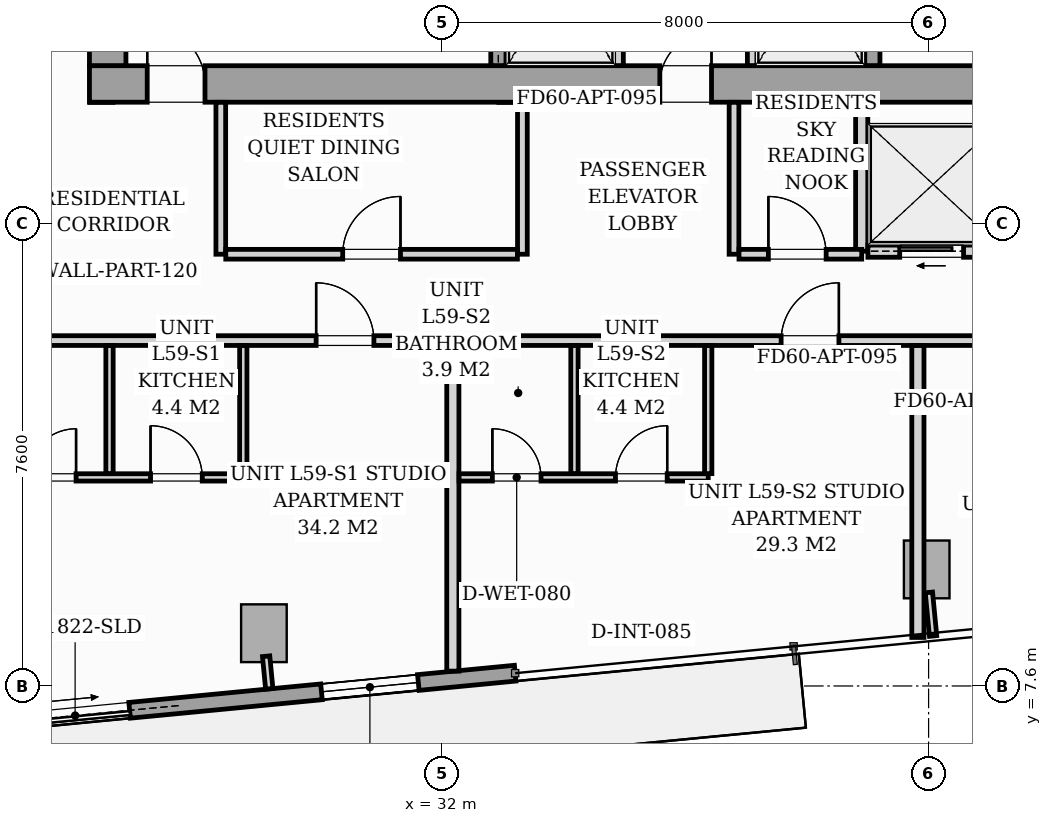
"""IFC4 building model, lengths in metres.
Left out: names, types, materials, properties, quantities, classifications, styles, units other than length and angle.
Written with IfcOpenShell. Run it as: python <this file> out.ifc"""

import sys

from ifc_helpers import new_model, si_unit, direction, frame, frame_2d, origin, origin_2d, place, context, subcontext, project, spatial, rectangle, i_section, extrude, source, transform, mapped, element, fill, save


model = new_model("IFC4")
c1 = context("Model", 3, precision=1e-05, world=origin(), true_north=direction((0.0, 1.0)))
c2 = subcontext(c1, "Body", "Model", "MODEL_VIEW")
j1 = project(units=[si_unit("LENGTHUNIT", "METRE"), si_unit("PLANEANGLEUNIT", "RADIAN")], contexts=[c1])
p1 = place(None, origin())
s1 = spatial("IfcSite", under=j1, at=p1, CompositionType="ELEMENT")
p2 = place(p1, origin())
s2 = spatial("IfcBuilding", under=s1, at=p2, CompositionType="ELEMENT")
p3 = place(p2, frame((0.0, 0.0, 205.0)))
s3 = spatial("IfcBuildingStorey", under=s2, at=p3, CompositionType="ELEMENT", Elevation=205.0)
m1 = source(origin(), c2, "Body", "SweptSolid", [
    extrude(i_section(OverallWidth=0.416, OverallDepth=0.446, WebThickness=0.039, FlangeThickness=0.063, FilletRadius=0.018, at=origin_2d()), origin(), (0.0, 0.0, 1.0), 3.196),
])
for number, where, z_axis, x_axis in (
    (1, (26.4, 17.4, 0.002), (0.0, 0.0, 1.0), (1.0, 0.0, 0.0)),
    (2, (33.12, 17.4, 0.002), (0.0, 0.0, 1.0), (1.0, 0.0, 0.0)),
    (3, (38.88, 17.4, 0.002), (0.0, 0.0, 1.0), (1.0, 0.0, 0.0)),
):
    element("IfcColumn", number, at=place(p3, frame(where, z_axis=z_axis, x_axis=x_axis)), inside=s3, PredefinedType="PILASTER", context=c2, shape_type="MappedRepresentation", body=[
        mapped(m1, transform((0.0, 0.0, 0.0), scale=1.0)),
    ])
m2 = source(origin(), c2, "Body", "SweptSolid", [
    extrude(rectangle(XDim=0.75, YDim=0.95, at=origin_2d()), origin(), (0.0, 0.0, 1.0), 3.196),
])
for number, where, z_axis, x_axis in (
    (4, (29.069, 8.467, 0.002), (0.0, 0.0, 1.0), (0.995, 0.096, 0.0)),
    (5, (39.969, 9.517, 0.002), (0.0, 0.0, 1.0), (0.995, 0.096, 0.0)),
):
    element("IfcColumn", number, at=place(p3, frame(where, z_axis=z_axis, x_axis=x_axis)), inside=s3, PredefinedType="COLUMN", context=c2, shape_type="MappedRepresentation", body=[
        mapped(m2, transform((0.0, 0.0, 0.0), scale=1.0)),
    ])
p4 = place(p3, frame((33.201, 7.81, 0.0), z_axis=(0.0, 0.0, 1.0), x_axis=(-0.995397074604, -0.095836652014, 0.0)))
e6 = element("IfcWall", 6, at=p4, inside=s3, PredefinedType="STANDARD", context=c2, shape_type="SweptSolid", body=[
    extrude(rectangle(XDim=16.1, YDim=0.26, at=frame_2d((8.05, 0.0))), origin(), (0.0, 0.0, 1.0), 2.94),
])
p5 = place(p4, frame((6.37, 0.0, 0.0)))
e7 = element("IfcOpeningElement", 7, at=p5, cuts=e6, PredefinedType="OPENING", context=c2, shape_type="SweptSolid", body=[
    extrude(rectangle(XDim=1.8, YDim=2.06, at=frame_2d((0.9, 1.03))), frame((0.0, 0.14, 0.0), z_axis=(0.0, -1.0, 0.0), x_axis=(1.0, 0.0, 0.0)), (0.0, 0.0, 1.0), 0.28),
])
p6 = place(p4, frame((1.6, 0.0, 0.65)))
e8 = element("IfcOpeningElement", 8, at=p6, cuts=e6, PredefinedType="OPENING", context=c2, shape_type="SweptSolid", body=[
    extrude(rectangle(XDim=1.6, YDim=1.5, at=frame_2d((0.8, 0.75))), frame((0.0, 0.14, 0.0), z_axis=(0.0, -1.0, 0.0), x_axis=(1.0, 0.0, 0.0)), (0.0, 0.0, 1.0), 0.28),
])
p7 = place(p3, frame((26.2, 17.5, 0.0), z_axis=(0.0, 0.0, 1.0), x_axis=(1.0, 0.0, 0.0)))
e9 = element("IfcWall", 9, at=p7, inside=s3, PredefinedType="SHEAR", context=c2, shape_type="SweptSolid", body=[
    extrude(rectangle(XDim=19.6, YDim=0.6, at=frame_2d((9.8, 0.0))), origin(), (0.0, 0.0, 1.0), 3.2),
])
p8 = place(p7, frame((0.95, 0.0, 0.0)))
e10 = element("IfcOpeningElement", 10, at=p8, cuts=e9, PredefinedType="OPENING", context=c2, shape_type="SweptSolid", body=[
    extrude(rectangle(XDim=0.95, YDim=2.06, at=frame_2d((0.475, 1.03))), frame((0.0, 0.31, 0.0), z_axis=(0.0, -1.0, 0.0), x_axis=(1.0, 0.0, 0.0)), (0.0, 0.0, 1.0), 0.62),
])
p9 = place(p7, frame((9.38, 0.0, 0.0)))
e11 = element("IfcOpeningElement", 11, at=p9, cuts=e9, PredefinedType="OPENING", context=c2, shape_type="SweptSolid", body=[
    extrude(rectangle(XDim=0.85, YDim=2.0, at=frame_2d((0.425, 1.0))), frame((0.0, 0.31, 0.0), z_axis=(0.0, -1.0, 0.0), x_axis=(1.0, 0.0, 0.0)), (0.0, 0.0, 1.0), 0.62),
])
p10 = place(p7, frame((17.55, 0.0, 0.0)))
e12 = element("IfcOpeningElement", 12, at=p10, cuts=e9, PredefinedType="OPENING", context=c2, shape_type="SweptSolid", body=[
    extrude(rectangle(XDim=0.95, YDim=2.06, at=frame_2d((0.475, 1.03))), frame((0.0, 0.31, 0.0), z_axis=(0.0, -1.0, 0.0), x_axis=(1.0, 0.0, 0.0)), (0.0, 0.0, 1.0), 0.62),
])
p11 = place(p3, frame((26.5, 17.802, 0.0), z_axis=(0.0, 0.0, 1.0), x_axis=(0.0, 1.0, 0.0)))
e13 = element("IfcWall", 13, at=p11, inside=s3, PredefinedType="SHEAR", context=c2, shape_type="SweptSolid", body=[
    extrude(rectangle(XDim=5.796, YDim=0.6, at=frame_2d((2.898, 0.0))), origin(), (0.0, 0.0, 1.0), 3.2),
])
p12 = place(p3, frame((32.925, 17.802, 0.0), z_axis=(0.0, 0.0, 1.0), x_axis=(0.0, 1.0, 0.0)))
e14 = element("IfcWall", 14, at=p12, inside=s3, PredefinedType="SOLIDWALL", context=c2, shape_type="SweptSolid", body=[
    extrude(rectangle(XDim=2.646, YDim=0.25, at=frame_2d((1.323, 0.0))), origin(), (0.0, 0.0, 1.0), 3.2),
])
p13 = place(p12, frame((0.548, 0.0, 0.0)))
e15 = element("IfcOpeningElement", 15, at=p13, cuts=e14, PredefinedType="OPENING", context=c2, shape_type="SweptSolid", body=[
    extrude(rectangle(XDim=1.1, YDim=2.08, at=frame_2d((0.55, 1.04))), frame((0.0, 0.135, 0.0), z_axis=(0.0, -1.0, 0.0), x_axis=(1.0, 0.0, 0.0)), (0.0, 0.0, 1.0), 0.27),
])
for number, where, z_axis, x_axis in (
    (16, (34.9, 17.802, 0.0), (0.0, 0.0, 1.0), (0.0, 1.0, 0.0)),
    (17, (37.1, 17.802, 0.0), (0.0, 0.0, 1.0), (0.0, 1.0, 0.0)),
):
    element("IfcWall", number, at=place(p3, frame(where, z_axis=z_axis, x_axis=x_axis)), inside=s3, PredefinedType="PARTITIONING", context=c2, shape_type="SweptSolid", body=[
        extrude(rectangle(XDim=2.646, YDim=0.16, at=frame_2d((1.323, 0.0))), origin(), (0.0, 0.0, 1.0), 2.94),
    ])
p14 = place(p3, frame((39.075, 17.802, 0.0), z_axis=(0.0, 0.0, 1.0), x_axis=(0.0, 1.0, 0.0)))
e18 = element("IfcWall", 18, at=p14, inside=s3, PredefinedType="SOLIDWALL", context=c2, shape_type="SweptSolid", body=[
    extrude(rectangle(XDim=2.646, YDim=0.25, at=frame_2d((1.323, 0.0))), origin(), (0.0, 0.0, 1.0), 3.2),
])
p15 = place(p14, frame((0.548, 0.0, 0.0)))
e19 = element("IfcOpeningElement", 19, at=p15, cuts=e18, PredefinedType="OPENING", context=c2, shape_type="SweptSolid", body=[
    extrude(rectangle(XDim=1.1, YDim=2.08, at=frame_2d((0.55, 1.04))), frame((0.0, 0.135, 0.0), z_axis=(0.0, -1.0, 0.0), x_axis=(1.0, 0.0, 0.0)), (0.0, 0.0, 1.0), 0.27),
])
p16 = place(p3, frame((38.9, 14.75, 0.0), z_axis=(0.0, 0.0, 1.0), x_axis=(0.0, 1.0, 0.0)))
e20 = element("IfcWall", 20, at=p16, inside=s3, PredefinedType="PARTITIONING", context=c2, shape_type="SweptSolid", body=[
    extrude(rectangle(XDim=2.35, YDim=0.2, at=frame_2d((1.175, 0.0))), origin(), (0.0, 0.0, 1.0), 2.94),
])
p17 = place(p3, frame((39.002, 14.75, 0.0), z_axis=(0.0, 0.0, 1.0), x_axis=(1.0, 0.0, 0.0)))
e21 = element("IfcWall", 21, at=p17, inside=s3, PredefinedType="PARTITIONING", context=c2, shape_type="SweptSolid", body=[
    extrude(rectangle(XDim=2.146, YDim=0.2, at=frame_2d((1.073, 0.0))), origin(), (0.0, 0.0, 1.0), 2.94),
])
p18 = place(p17, frame((0.523, 0.0, 0.0)))
e22 = element("IfcOpeningElement", 22, at=p18, cuts=e21, PredefinedType="OPENING", context=c2, shape_type="SweptSolid", body=[
    extrude(rectangle(XDim=1.05, YDim=2.08, at=frame_2d((0.525, 1.04))), frame((0.0, 0.11, 0.0), z_axis=(0.0, -1.0, 0.0), x_axis=(1.0, 0.0, 0.0)), (0.0, 0.0, 1.0), 0.22),
])
p19 = place(p3, frame((24.55, 13.28, 0.0), z_axis=(0.0, 0.0, 1.0), x_axis=(1.0, 0.0, 0.0)))
e23 = element("IfcWall", 23, at=p19, inside=s3, PredefinedType="PARTITIONING", context=c2, shape_type="SweptSolid", body=[
    extrude(rectangle(XDim=22.9, YDim=0.16, at=frame_2d((11.45, 0.0))), origin(), (0.0, 0.0, 1.0), 2.94),
])
p20 = place(p19, frame((5.378, 0.0, 0.0)))
e24 = element("IfcOpeningElement", 24, at=p20, cuts=e23, PredefinedType="OPENING", context=c2, shape_type="SweptSolid", body=[
    extrude(rectangle(XDim=0.95, YDim=2.06, at=frame_2d((0.475, 1.03))), frame((0.0, 0.09, 0.0), z_axis=(0.0, -1.0, 0.0), x_axis=(1.0, 0.0, 0.0)), (0.0, 0.0, 1.0), 0.18),
])
p21 = place(p19, frame((13.025, 0.0, 0.0)))
e25 = element("IfcOpeningElement", 25, at=p21, cuts=e23, PredefinedType="OPENING", context=c2, shape_type="SweptSolid", body=[
    extrude(rectangle(XDim=0.95, YDim=2.06, at=frame_2d((0.475, 1.03))), frame((0.0, 0.09, 0.0), z_axis=(0.0, -1.0, 0.0), x_axis=(1.0, 0.0, 0.0)), (0.0, 0.0, 1.0), 0.18),
])
p22 = place(p19, frame((16.572, 0.0, 0.0)))
e26 = element("IfcOpeningElement", 26, at=p22, cuts=e23, PredefinedType="OPENING", context=c2, shape_type="SweptSolid", body=[
    extrude(rectangle(XDim=0.95, YDim=2.06, at=frame_2d((0.475, 1.03))), frame((0.0, 0.09, 0.0), z_axis=(0.0, -1.0, 0.0), x_axis=(1.0, 0.0, 0.0)), (0.0, 0.0, 1.0), 0.18),
])
p23 = place(p3, frame((24.632, 11.03, 0.0), z_axis=(0.0, 0.0, 1.0), x_axis=(1.0, 0.0, 0.0)))
e27 = element("IfcWall", 27, at=p23, inside=s3, PredefinedType="PARTITIONING", context=c2, shape_type="SweptSolid", body=[
    extrude(rectangle(XDim=4.098, YDim=0.12, at=frame_2d((2.049, 0.0))), origin(), (0.0, 0.0, 1.0), 2.94),
])
p24 = place(p23, frame((0.548, 0.0, 0.0)))
e28 = element("IfcOpeningElement", 28, at=p24, cuts=e27, PredefinedType="OPENING", context=c2, shape_type="SweptSolid", body=[
    extrude(rectangle(XDim=0.8, YDim=2.02, at=frame_2d((0.4, 1.01))), frame((0.0, 0.07, 0.0), z_axis=(0.0, -1.0, 0.0), x_axis=(1.0, 0.0, 0.0)), (0.0, 0.0, 1.0), 0.14),
])
p25 = place(p23, frame((2.573, 0.0, 0.0)))
e29 = element("IfcOpeningElement", 29, at=p25, cuts=e27, PredefinedType="OPENING", context=c2, shape_type="SweptSolid", body=[
    extrude(rectangle(XDim=0.85, YDim=2.05, at=frame_2d((0.425, 1.025))), frame((0.0, 0.07, 0.0), z_axis=(0.0, -1.0, 0.0), x_axis=(1.0, 0.0, 0.0)), (0.0, 0.0, 1.0), 0.14),
])
for number, where, z_axis, x_axis in (
    (30, (28.73, 11.092, 0.0), (0.0, 0.0, 1.0), (0.0, 1.0, 0.0)),
    (31, (26.53, 11.092, 0.0), (0.0, 0.0, 1.0), (0.0, 1.0, 0.0)),
):
    element("IfcWall", number, at=place(p3, frame(where, z_axis=z_axis, x_axis=x_axis)), inside=s3, PredefinedType="PARTITIONING", context=c2, shape_type="SweptSolid", body=[
        extrude(rectangle(XDim=2.106, YDim=0.12, at=frame_2d((1.053, 0.0))), origin(), (0.0, 0.0, 1.0), 2.94),
    ])
p26 = place(p3, frame((32.176, 7.844, 0.0), z_axis=(0.0, 0.0, 1.0), x_axis=(0.0, 1.0, 0.0)))
e32 = element("IfcWall", 32, at=p26, inside=s3, PredefinedType="PARTITIONING", context=c2, shape_type="SweptSolid", body=[
    extrude(rectangle(XDim=5.354, YDim=0.2, at=frame_2d((2.677, 0.0))), origin(), (0.0, 0.0, 1.0), 2.94),
])
p27 = place(p3, frame((32.278, 11.03, 0.0), z_axis=(0.0, 0.0, 1.0), x_axis=(1.0, 0.0, 0.0)))
e33 = element("IfcWall", 33, at=p27, inside=s3, PredefinedType="PARTITIONING", context=c2, shape_type="SweptSolid", body=[
    extrude(rectangle(XDim=4.098, YDim=0.12, at=frame_2d((2.049, 0.0))), origin(), (0.0, 0.0, 1.0), 2.94),
])
p28 = place(p27, frame((0.548, 0.0, 0.0)))
e34 = element("IfcOpeningElement", 34, at=p28, cuts=e33, PredefinedType="OPENING", context=c2, shape_type="SweptSolid", body=[
    extrude(rectangle(XDim=0.8, YDim=2.02, at=frame_2d((0.4, 1.01))), frame((0.0, 0.07, 0.0), z_axis=(0.0, -1.0, 0.0), x_axis=(1.0, 0.0, 0.0)), (0.0, 0.0, 1.0), 0.14),
])
p29 = place(p27, frame((2.573, 0.0, 0.0)))
e35 = element("IfcOpeningElement", 35, at=p29, cuts=e33, PredefinedType="OPENING", context=c2, shape_type="SweptSolid", body=[
    extrude(rectangle(XDim=0.85, YDim=2.05, at=frame_2d((0.425, 1.025))), frame((0.0, 0.07, 0.0), z_axis=(0.0, -1.0, 0.0), x_axis=(1.0, 0.0, 0.0)), (0.0, 0.0, 1.0), 0.14),
])
for number, where, z_axis, x_axis in (
    (36, (36.376, 11.092, 0.0), (0.0, 0.0, 1.0), (0.0, 1.0, 0.0)),
    (37, (34.176, 11.092, 0.0), (0.0, 0.0, 1.0), (0.0, 1.0, 0.0)),
):
    element("IfcWall", number, at=place(p3, frame(where, z_axis=z_axis, x_axis=x_axis)), inside=s3, PredefinedType="PARTITIONING", context=c2, shape_type="SweptSolid", body=[
        extrude(rectangle(XDim=2.106, YDim=0.12, at=frame_2d((1.053, 0.0))), origin(), (0.0, 0.0, 1.0), 2.94),
    ])
p30 = place(p3, frame((39.824, 8.398, 0.0), z_axis=(0.0, 0.0, 1.0), x_axis=(0.0, 1.0, 0.0)))
e38 = element("IfcWall", 38, at=p30, inside=s3, PredefinedType="PARTITIONING", context=c2, shape_type="SweptSolid", body=[
    extrude(rectangle(XDim=4.8, YDim=0.2, at=frame_2d((2.4, 0.0))), origin(), (0.0, 0.0, 1.0), 2.94),
])
for number, where, z_axis, x_axis in (
    (39, (28.36, 14.7, 0.0), (0.0, 0.0, 1.0), (0.0, 1.0, 0.0)),
    (40, (33.32, 14.7, 0.0), (0.0, 0.0, 1.0), (0.0, 1.0, 0.0)),
):
    element("IfcWall", number, at=place(p3, frame(where, z_axis=z_axis, x_axis=x_axis)), inside=s3, PredefinedType="PARTITIONING", context=c2, shape_type="SweptSolid", body=[
        extrude(rectangle(XDim=2.498, YDim=0.16, at=frame_2d((1.249, 0.0))), origin(), (0.0, 0.0, 1.0), 2.94),
    ])
p31 = place(p3, frame((28.442, 14.7, 0.0), z_axis=(0.0, 0.0, 1.0), x_axis=(1.0, 0.0, 0.0)))
e41 = element("IfcWall", 41, at=p31, inside=s3, PredefinedType="PARTITIONING", context=c2, shape_type="SweptSolid", body=[
    extrude(rectangle(XDim=4.796, YDim=0.16, at=frame_2d((2.398, 0.0))), origin(), (0.0, 0.0, 1.0), 2.94),
])
p32 = place(p31, frame((1.923, 0.0, 0.0)))
e42 = element("IfcOpeningElement", 42, at=p32, cuts=e41, PredefinedType="OPENING", context=c2, shape_type="SweptSolid", body=[
    extrude(rectangle(XDim=0.95, YDim=2.06, at=frame_2d((0.475, 1.03))), frame((0.0, 0.09, 0.0), z_axis=(0.0, -1.0, 0.0), x_axis=(1.0, 0.0, 0.0)), (0.0, 0.0, 1.0), 0.18),
])
p33 = place(p3, frame((36.8, 14.7, 0.0), z_axis=(0.0, 0.0, 1.0), x_axis=(0.0, 1.0, 0.0)))
e43 = element("IfcWall", 43, at=p33, inside=s3, PredefinedType="PARTITIONING", context=c2, shape_type="SweptSolid", body=[
    extrude(rectangle(XDim=2.498, YDim=0.16, at=frame_2d((1.249, 0.0))), origin(), (0.0, 0.0, 1.0), 2.94),
])
p34 = place(p3, frame((36.882, 14.7, 0.0), z_axis=(0.0, 0.0, 1.0), x_axis=(1.0, 0.0, 0.0)))
e44 = element("IfcWall", 44, at=p34, inside=s3, PredefinedType="PARTITIONING", context=c2, shape_type="SweptSolid", body=[
    extrude(rectangle(XDim=2.018, YDim=0.16, at=frame_2d((1.009, 0.0))), origin(), (0.0, 0.0, 1.0), 2.94),
])
p35 = place(p34, frame((0.483, 0.0, 0.0)))
e45 = element("IfcOpeningElement", 45, at=p35, cuts=e44, PredefinedType="OPENING", context=c2, shape_type="SweptSolid", body=[
    extrude(rectangle(XDim=0.95, YDim=2.06, at=frame_2d((0.475, 1.03))), frame((0.0, 0.09, 0.0), z_axis=(0.0, -1.0, 0.0), x_axis=(1.0, 0.0, 0.0)), (0.0, 0.0, 1.0), 0.18),
])
p36 = place(p3, frame((29.105, 8.089, 0.0), z_axis=(0.0, 0.0, 1.0), x_axis=(0.095772948675, -0.995403205893, 0.0)))
e46 = element("IfcWall", 46, at=p36, inside=s3, PredefinedType="PARTITIONING", context=c2, shape_type="SweptSolid", body=[
    extrude(rectangle(XDim=0.538, YDim=0.12, at=frame_2d((0.269, 0.0))), origin(), (0.0, 0.0, 1.0), 2.94),
])
p37 = place(p3, frame((40.005, 9.139, 0.0), z_axis=(0.0, 0.0, 1.0), x_axis=(0.095977354523, -0.995383517755, 0.0)))
e47 = element("IfcWall", 47, at=p37, inside=s3, PredefinedType="PARTITIONING", context=c2, shape_type="SweptSolid", body=[
    extrude(rectangle(XDim=0.72, YDim=0.12, at=frame_2d((0.36, 0.0))), origin(), (0.0, 0.0, 1.0), 2.94),
])
m3 = source(origin(), c2, "Body", "SweptSolid", [
    extrude(rectangle(XDim=1.8, YDim=2.06, at=frame_2d((0.9, 1.03))), frame((0.0, 0.025, 0.0), z_axis=(0.0, -1.0, 0.0), x_axis=(1.0, 0.0, 0.0)), (0.0, 0.0, 1.0), 0.05),
])
p38 = place(p5, origin())
e48 = element("IfcDoor", 48, at=p38, inside=s3, OperationType="SLIDING_TO_LEFT", PredefinedType="DOOR", context=c2, shape_type="MappedRepresentation", body=[
    mapped(m3, transform((0.0, 0.0, 0.0), scale=1.0)),
])
fill(e7, e48)
m4 = source(origin(), c2, "Body", "SweptSolid", [
    extrude(rectangle(XDim=1.6, YDim=1.5, at=frame_2d((0.8, 0.75))), frame((0.0, 0.03, 0.0), z_axis=(0.0, -1.0, 0.0), x_axis=(1.0, 0.0, 0.0)), (0.0, 0.0, 1.0), 0.06),
])
p39 = place(p6, origin())
e49 = element("IfcWindow", 49, at=p39, inside=s3, PartitioningType="SINGLE_PANEL", PredefinedType="WINDOW", context=c2, shape_type="MappedRepresentation", body=[
    mapped(m4, transform((0.0, 0.0, 0.0), scale=1.0)),
])
fill(e8, e49)
m5 = source(origin(), c2, "Body", "SweptSolid", [
    extrude(rectangle(XDim=0.95, YDim=2.06, at=frame_2d((0.475, 1.03))), frame((0.0, 0.025, 0.0), z_axis=(0.0, -1.0, 0.0), x_axis=(1.0, 0.0, 0.0)), (0.0, 0.0, 1.0), 0.05),
])
p40 = place(p8, origin())
e50 = element("IfcDoor", 50, at=p40, inside=s3, OperationType="SINGLE_SWING_LEFT", PredefinedType="DOOR", context=c2, shape_type="MappedRepresentation", body=[
    mapped(m5, transform((0.0, 0.0, 0.0), scale=1.0)),
])
fill(e10, e50)
m6 = source(origin(), c2, "Body", "SweptSolid", [
    extrude(rectangle(XDim=0.85, YDim=2.0, at=frame_2d((0.425, 1.0))), frame((0.0, 0.025, 0.0), z_axis=(0.0, -1.0, 0.0), x_axis=(1.0, 0.0, 0.0)), (0.0, 0.0, 1.0), 0.05),
])
p41 = place(p9, origin())
e51 = element("IfcDoor", 51, at=p41, inside=s3, OperationType="SINGLE_SWING_RIGHT", PredefinedType="DOOR", context=c2, shape_type="MappedRepresentation", body=[
    mapped(m6, transform((0.0, 0.0, 0.0), scale=1.0)),
])
fill(e11, e51)
m7 = source(origin(), c2, "Body", "SweptSolid", [
    extrude(rectangle(XDim=1.05, YDim=2.08, at=frame_2d((0.525, 1.04))), frame((0.0, 0.025, 0.0), z_axis=(0.0, -1.0, 0.0), x_axis=(1.0, 0.0, 0.0)), (0.0, 0.0, 1.0), 0.05),
])
p42 = place(p18, origin())
e52 = element("IfcDoor", 52, at=p42, inside=s3, OperationType="SLIDING_TO_LEFT", PredefinedType="DOOR", context=c2, shape_type="MappedRepresentation", body=[
    mapped(m7, transform((0.0, 0.0, 0.0), scale=1.0)),
])
fill(e22, e52)
m8 = source(origin(), c2, "Body", "SweptSolid", [
    extrude(rectangle(XDim=0.95, YDim=2.06, at=frame_2d((0.475, 1.03))), frame((0.0, 0.025, 0.0), z_axis=(0.0, -1.0, 0.0), x_axis=(1.0, 0.0, 0.0)), (0.0, 0.0, 1.0), 0.05),
])
p43 = place(p20, origin())
e53 = element("IfcDoor", 53, at=p43, inside=s3, OperationType="SINGLE_SWING_LEFT", PredefinedType="DOOR", context=c2, shape_type="MappedRepresentation", body=[
    mapped(m8, transform((0.0, 0.0, 0.0), scale=1.0)),
])
fill(e24, e53)
m9 = source(origin(), c2, "Body", "SweptSolid", [
    extrude(rectangle(XDim=0.8, YDim=2.02, at=frame_2d((0.4, 1.01))), frame((0.0, 0.025, 0.0), z_axis=(0.0, -1.0, 0.0), x_axis=(1.0, 0.0, 0.0)), (0.0, 0.0, 1.0), 0.05),
])
p44 = place(p24, origin())
e54 = element("IfcDoor", 54, at=p44, inside=s3, OperationType="SINGLE_SWING_RIGHT", PredefinedType="DOOR", context=c2, shape_type="MappedRepresentation", body=[
    mapped(m9, transform((0.0, 0.0, 0.0), scale=1.0)),
])
fill(e28, e54)
m10 = source(origin(), c2, "Body", "SweptSolid", [
    extrude(rectangle(XDim=0.85, YDim=2.05, at=frame_2d((0.425, 1.025))), frame((0.0, 0.025, 0.0), z_axis=(0.0, -1.0, 0.0), x_axis=(1.0, 0.0, 0.0)), (0.0, 0.0, 1.0), 0.05),
])
p45 = place(p25, origin())
e55 = element("IfcDoor", 55, at=p45, inside=s3, OperationType="SINGLE_SWING_LEFT", PredefinedType="DOOR", context=c2, shape_type="MappedRepresentation", body=[
    mapped(m10, transform((0.0, 0.0, 0.0), scale=1.0)),
])
fill(e29, e55)
p46 = place(p21, origin())
e56 = element("IfcDoor", 56, at=p46, inside=s3, OperationType="SINGLE_SWING_RIGHT", PredefinedType="DOOR", context=c2, shape_type="MappedRepresentation", body=[
    mapped(m8, transform((0.0, 0.0, 0.0), scale=1.0)),
])
fill(e25, e56)
p47 = place(p28, origin())
e57 = element("IfcDoor", 57, at=p47, inside=s3, OperationType="SINGLE_SWING_LEFT", PredefinedType="DOOR", context=c2, shape_type="MappedRepresentation", body=[
    mapped(m9, transform((0.0, 0.0, 0.0), scale=1.0)),
])
fill(e34, e57)
p48 = place(p29, origin())
e58 = element("IfcDoor", 58, at=p48, inside=s3, OperationType="SINGLE_SWING_RIGHT", PredefinedType="DOOR", context=c2, shape_type="MappedRepresentation", body=[
    mapped(m10, transform((0.0, 0.0, 0.0), scale=1.0)),
])
fill(e35, e58)
p49 = place(p32, origin())
e59 = element("IfcDoor", 59, at=p49, inside=s3, OperationType="SINGLE_SWING_RIGHT", PredefinedType="DOOR", context=c2, shape_type="MappedRepresentation", body=[
    mapped(m8, transform((0.0, 0.0, 0.0), scale=1.0)),
])
fill(e42, e59)
p50 = place(p35, origin())
e60 = element("IfcDoor", 60, at=p50, inside=s3, OperationType="SINGLE_SWING_LEFT", PredefinedType="DOOR", context=c2, shape_type="MappedRepresentation", body=[
    mapped(m8, transform((0.0, 0.0, 0.0), scale=1.0)),
])
fill(e45, e60)
save(model, sys.argv[1])
